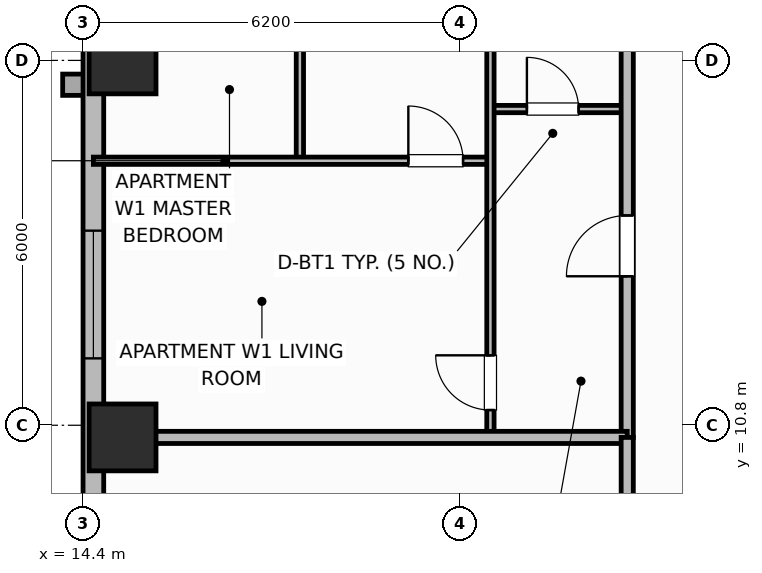
"""IFC4 building model, lengths in metres.
Left out: names, types, materials, properties, quantities, classifications, styles, units other than length and angle.
Written with IfcOpenShell. Run it as: python <this file> out.ifc"""

import sys

from ifc_helpers import new_model, si_unit, direction, frame, frame_2d, origin, origin_2d, place, context, subcontext, project, spatial, rectangle, extrude, element, fill, save


model = new_model("IFC4")
c1 = context("Model", 3, precision=1e-05, world=origin(), true_north=direction((0.0, 1.0)))
c2 = subcontext(c1, "Body", "Model", "MODEL_VIEW")
j1 = project(units=[si_unit("LENGTHUNIT", "METRE"), si_unit("PLANEANGLEUNIT", "RADIAN")], contexts=[c1])
p1 = place(None, origin())
s1 = spatial("IfcSite", under=j1, at=p1, CompositionType="ELEMENT")
p2 = place(p1, origin())
s2 = spatial("IfcBuilding", under=s1, at=p2, CompositionType="ELEMENT")
p3 = place(p2, frame((0.0, 0.0, 117.9)))
s3 = spatial("IfcBuildingStorey", under=s2, at=p3, CompositionType="ELEMENT", Elevation=117.9)
for number, where, z_axis, x_axis in (
    (1, (15.05, 10.6, 0.0), (0.0, 0.0, 1.0), (1.0, 0.0, 0.0)),
    (2, (15.05, 16.8, 0.0), (0.0, 0.0, 1.0), (1.0, 0.0, 0.0)),
):
    element("IfcColumn", number, at=place(p3, frame(where, z_axis=z_axis, x_axis=x_axis)), inside=s3, PredefinedType="COLUMN", context=c2, shape_type="SweptSolid", body=[
        extrude(rectangle(XDim=1.1, YDim=1.1, at=origin_2d()), origin(), (0.0, 0.0, 1.0), 3.7),
    ])
p4 = place(p3, frame((14.57, 23.8, 0.0), z_axis=(0.0, 0.0, 1.0), x_axis=(0.0, -1.0, 0.0)))
e3 = element("IfcWall", 3, at=p4, inside=s3, PredefinedType="SOLIDWALL", context=c2, shape_type="SweptSolid", body=[
    extrude(rectangle(XDim=14.8, YDim=0.34, at=frame_2d((7.4, 0.0))), origin(), (0.0, 0.0, 1.0), 2.7),
])
p5 = place(p4, frame((2.1, 0.0, 0.0)))
e4 = element("IfcOpeningElement", 4, at=p5, cuts=e3, PredefinedType="OPENING", context=c2, shape_type="SweptSolid", body=[
    extrude(rectangle(XDim=1.6, YDim=2.1, at=frame_2d((0.8, 1.05))), frame((0.0, 0.18, 0.0), z_axis=(0.0, -1.0, 0.0), x_axis=(1.0, 0.0, 0.0)), (0.0, 0.0, 1.0), 0.36),
])
p6 = place(p4, frame((9.8, 0.0, 0.68)))
e5 = element("IfcOpeningElement", 5, at=p6, cuts=e3, PredefinedType="OPENING", context=c2, shape_type="SweptSolid", body=[
    extrude(rectangle(XDim=2.1, YDim=1.9, at=frame_2d((1.05, 0.95))), frame((0.0, 0.18, 0.0), z_axis=(0.0, -1.0, 0.0), x_axis=(1.0, 0.0, 0.0)), (0.0, 0.0, 1.0), 0.36),
])
p7 = place(p3, frame((21.1, 16.0, 0.0), z_axis=(0.0, 0.0, 1.0), x_axis=(1.0, 0.0, 0.0)))
e6 = element("IfcWall", 6, at=p7, inside=s3, PredefinedType="PARTITIONING", context=c2, shape_type="SweptSolid", body=[
    extrude(rectangle(XDim=2.25, YDim=0.12, at=frame_2d((1.125, 0.0))), origin(), (0.0, 0.0, 1.0), 2.53),
])
p8 = place(p7, frame((0.6, 0.0, 0.0)))
e7 = element("IfcOpeningElement", 7, at=p8, cuts=e6, PredefinedType="OPENING", context=c2, shape_type="SweptSolid", body=[
    extrude(rectangle(XDim=0.85, YDim=2.1, at=frame_2d((0.425, 1.05))), frame((0.0, 0.07, 0.0), z_axis=(0.0, -1.0, 0.0), x_axis=(1.0, 0.0, 0.0)), (0.0, 0.0, 1.0), 0.14),
])
p9 = place(p3, frame((17.966, 15.19, 0.0), z_axis=(0.0, 0.0, 1.0), x_axis=(0.0, 1.0, 0.0)))
e8 = element("IfcWall", 8, at=p9, inside=s3, PredefinedType="PARTITIONING", context=c2, shape_type="SweptSolid", body=[
    extrude(rectangle(XDim=7.52, YDim=0.12, at=frame_2d((3.76, 0.0))), origin(), (0.0, 0.0, 1.0), 2.53),
])
p10 = place(p9, frame((2.86, 0.0, 0.0)))
e9 = element("IfcOpeningElement", 9, at=p10, cuts=e8, PredefinedType="OPENING", context=c2, shape_type="SweptSolid", body=[
    extrude(rectangle(XDim=0.9, YDim=2.1, at=frame_2d((0.45, 1.05))), frame((0.0, 0.07, 0.0), z_axis=(0.0, -1.0, 0.0), x_axis=(1.0, 0.0, 0.0)), (0.0, 0.0, 1.0), 0.14),
])
p11 = place(p3, frame((14.57, 15.15, 0.0), z_axis=(0.0, 0.0, 1.0), x_axis=(1.0, 0.0, 0.0)))
e10 = element("IfcWall", 10, at=p11, inside=s3, PredefinedType="PARTITIONING", context=c2, shape_type="SweptSolid", body=[
    extrude(rectangle(XDim=6.53, YDim=0.12, at=frame_2d((3.265, 0.0))), origin(), (0.0, 0.0, 1.0), 2.53),
])
p12 = place(p11, frame((5.18, 0.0, 0.0)))
e11 = element("IfcOpeningElement", 11, at=p12, cuts=e10, PredefinedType="OPENING", context=c2, shape_type="SweptSolid", body=[
    extrude(rectangle(XDim=0.9, YDim=2.1, at=frame_2d((0.45, 1.05))), frame((0.0, 0.07, 0.0), z_axis=(0.0, -1.0, 0.0), x_axis=(1.0, 0.0, 0.0)), (0.0, 0.0, 1.0), 0.14),
])
p13 = place(p3, frame((21.1, 10.64, 0.0), z_axis=(0.0, 0.0, 1.0), x_axis=(0.0, 1.0, 0.0)))
e12 = element("IfcWall", 12, at=p13, inside=s3, PredefinedType="PARTITIONING", context=c2, shape_type="SweptSolid", body=[
    extrude(rectangle(XDim=15.92, YDim=0.12, at=frame_2d((7.96, 0.0))), origin(), (0.0, 0.0, 1.0), 2.53),
])
p14 = place(p13, frame((0.41, 0.0, 0.0)))
e13 = element("IfcOpeningElement", 13, at=p14, cuts=e12, PredefinedType="OPENING", context=c2, shape_type="SweptSolid", body=[
    extrude(rectangle(XDim=0.9, YDim=2.1, at=frame_2d((0.45, 1.05))), frame((0.0, 0.07, 0.0), z_axis=(0.0, -1.0, 0.0), x_axis=(1.0, 0.0, 0.0)), (0.0, 0.0, 1.0), 0.14),
])
p15 = place(p13, frame((13.125, 0.0, 0.0)))
e14 = element("IfcOpeningElement", 14, at=p15, cuts=e12, PredefinedType="OPENING", context=c2, shape_type="SweptSolid", body=[
    extrude(rectangle(XDim=0.82, YDim=2.08, at=frame_2d((0.41, 1.04))), frame((0.0, 0.07, 0.0), z_axis=(0.0, -1.0, 0.0), x_axis=(1.0, 0.0, 0.0)), (0.0, 0.0, 1.0), 0.14),
])
p16 = place(p3, frame((23.35, 10.6, 0.0), z_axis=(0.0, 0.0, 1.0), x_axis=(0.0, 1.0, 0.0)))
e15 = element("IfcWall", 15, at=p16, inside=s3, PredefinedType="PARTITIONING", context=c2, shape_type="SweptSolid", body=[
    extrude(rectangle(XDim=35.2, YDim=0.2, at=frame_2d((17.6, 0.0))), origin(), (0.0, 0.0, 1.0), 2.53),
])
p17 = place(p16, frame((2.65, 0.0, 0.0)))
e16 = element("IfcOpeningElement", 16, at=p17, cuts=e15, PredefinedType="OPENING", context=c2, shape_type="SweptSolid", body=[
    extrude(rectangle(XDim=1.0, YDim=2.15, at=frame_2d((0.5, 1.075))), frame((0.0, 0.11, 0.0), z_axis=(0.0, -1.0, 0.0), x_axis=(1.0, 0.0, 0.0)), (0.0, 0.0, 1.0), 0.22),
])
p18 = place(p16, frame((19.95, 0.0, 0.0)))
e17 = element("IfcOpeningElement", 17, at=p18, cuts=e15, PredefinedType="OPENING", context=c2, shape_type="SweptSolid", body=[
    extrude(rectangle(XDim=1.0, YDim=2.15, at=frame_2d((0.5, 1.075))), frame((0.0, 0.11, 0.0), z_axis=(0.0, -1.0, 0.0), x_axis=(1.0, 0.0, 0.0)), (0.0, 0.0, 1.0), 0.22),
])
p19 = place(p3, frame((14.99, 10.6, 0.0), z_axis=(0.0, 0.0, 1.0), x_axis=(1.0, 0.0, 0.0)))
e18 = element("IfcWall", 18, at=p19, inside=s3, PredefinedType="PARTITIONING", context=c2, shape_type="SweptSolid", body=[
    extrude(rectangle(XDim=8.36, YDim=0.2, at=frame_2d((4.18, 0.0))), origin(), (0.0, 0.0, 1.0), 2.53),
])
p20 = place(p3, frame((23.35, 4.97, 0.0), z_axis=(0.0, 0.0, 1.0), x_axis=(0.0, 1.0, 0.0)))
e19 = element("IfcWall", 19, at=p20, inside=s3, PredefinedType="PARTITIONING", context=c2, shape_type="SweptSolid", body=[
    extrude(rectangle(XDim=5.63, YDim=0.2, at=frame_2d((2.815, 0.0))), origin(), (0.0, 0.0, 1.0), 2.53),
])
p21 = place(p6, origin())
e20 = element("IfcWindow", 20, at=p21, inside=s3, PartitioningType="SINGLE_PANEL", PredefinedType="WINDOW", context=c2, shape_type="SweptSolid", body=[
    extrude(rectangle(XDim=2.1, YDim=1.9, at=frame_2d((1.05, 0.95))), frame((0.0, 0.03, 0.0), z_axis=(0.0, -1.0, 0.0), x_axis=(1.0, 0.0, 0.0)), (0.0, 0.0, 1.0), 0.06),
])
fill(e5, e20)
p22 = place(p8, origin())
e21 = element("IfcDoor", 21, at=p22, inside=s3, OperationType="SINGLE_SWING_LEFT", PredefinedType="DOOR", context=c2, shape_type="SweptSolid", body=[
    extrude(rectangle(XDim=0.85, YDim=2.1, at=frame_2d((0.425, 1.05))), frame((0.0, 0.025, 0.0), z_axis=(0.0, -1.0, 0.0), x_axis=(1.0, 0.0, 0.0)), (0.0, 0.0, 1.0), 0.05),
])
fill(e7, e21)
p23 = place(p12, origin())
e22 = element("IfcDoor", 22, at=p23, inside=s3, OperationType="SINGLE_SWING_LEFT", PredefinedType="DOOR", context=c2, shape_type="SweptSolid", body=[
    extrude(rectangle(XDim=0.9, YDim=2.1, at=frame_2d((0.45, 1.05))), frame((0.0, 0.025, 0.0), z_axis=(0.0, -1.0, 0.0), x_axis=(1.0, 0.0, 0.0)), (0.0, 0.0, 1.0), 0.05),
])
fill(e11, e22)
p24 = place(p14, origin())
e23 = element("IfcDoor", 23, at=p24, inside=s3, OperationType="SINGLE_SWING_RIGHT", PredefinedType="DOOR", context=c2, shape_type="SweptSolid", body=[
    extrude(rectangle(XDim=0.9, YDim=2.1, at=frame_2d((0.45, 1.05))), frame((0.0, 0.025, 0.0), z_axis=(0.0, -1.0, 0.0), x_axis=(1.0, 0.0, 0.0)), (0.0, 0.0, 1.0), 0.05),
])
fill(e13, e23)
p25 = place(p17, origin())
e24 = element("IfcDoor", 24, at=p25, inside=s3, OperationType="SINGLE_SWING_LEFT", PredefinedType="DOOR", context=c2, shape_type="SweptSolid", body=[
    extrude(rectangle(XDim=1.0, YDim=2.15, at=frame_2d((0.5, 1.075))), frame((0.0, 0.025, 0.0), z_axis=(0.0, -1.0, 0.0), x_axis=(1.0, 0.0, 0.0)), (0.0, 0.0, 1.0), 0.05),
])
fill(e16, e24)
save(model, sys.argv[1])
